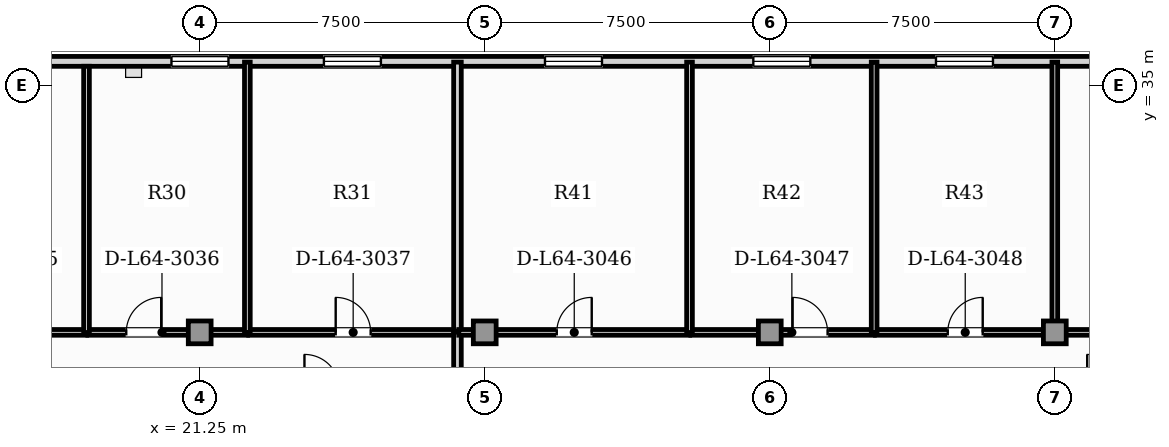
"""IFC4 building model, lengths in metres.
Left out: names, types, materials, properties, quantities, classifications, styles, units other than length and angle.
Written with IfcOpenShell. Run it as: python <this file> out.ifc"""

import sys

from ifc_helpers import new_model, si_unit, direction, frame, frame_2d, origin, origin_2d, place, context, subcontext, project, spatial, rectangle, extrude, element, fill, save


model = new_model("IFC4")
c1 = context("Model", 3, precision=1e-05, world=origin(), true_north=direction((0.0, 1.0)))
c2 = subcontext(c1, "Body", "Model", "MODEL_VIEW")
j1 = project(units=[si_unit("LENGTHUNIT", "METRE"), si_unit("PLANEANGLEUNIT", "RADIAN")], contexts=[c1])
p1 = place(None, origin())
s1 = spatial("IfcSite", under=j1, at=p1, CompositionType="ELEMENT")
p2 = place(p1, origin())
s2 = spatial("IfcBuilding", under=s1, at=p2, CompositionType="ELEMENT")
p3 = place(p2, frame((0.0, 0.0, 260.6)))
s3 = spatial("IfcBuildingStorey", under=s2, at=p3, CompositionType="ELEMENT", Elevation=260.6)
for number, where, z_axis, x_axis in (
    (1, (21.25, 28.5, 0.0), (0.0, 0.0, 1.0), (1.0, 0.0, 0.0)),
    (2, (28.75, 28.5, 0.0), (0.0, 0.0, 1.0), (1.0, 0.0, 0.0)),
    (3, (36.25, 28.5, 0.0), (0.0, 0.0, 1.0), (1.0, 0.0, 0.0)),
    (4, (43.75, 28.5, 0.0), (0.0, 0.0, 1.0), (1.0, 0.0, 0.0)),
):
    element("IfcColumn", number, at=place(p3, frame(where, z_axis=z_axis, x_axis=x_axis)), inside=s3, PredefinedType="COLUMN", context=c2, shape_type="SweptSolid", body=[
        extrude(rectangle(XDim=0.6, YDim=0.6, at=origin_2d()), origin(), (0.0, 0.0, 1.0), 3.85),
    ])
p4 = place(p3, frame((46.262, 35.631, 0.0), z_axis=(0.0, 0.0, 1.0), x_axis=(-1.0, 0.0, 0.0)))
e5 = element("IfcWall", 5, at=p4, inside=s3, PredefinedType="SOLIDWALL", context=c2, shape_type="SweptSolid", body=[
    extrude(rectangle(XDim=35.024, YDim=0.26, at=frame_2d((17.512, 0.0))), origin(), (0.0, 0.0, 1.0), 3.65),
])
p5 = place(p4, frame((32.755, 0.0, 0.9)))
e6 = element("IfcOpeningElement", 6, at=p5, cuts=e5, PredefinedType="OPENING", context=c2, shape_type="SweptSolid", body=[
    extrude(rectangle(XDim=1.5, YDim=1.95, at=frame_2d((0.75, 0.975))), frame((0.0, 0.14, 0.0), z_axis=(0.0, -1.0, 0.0), x_axis=(1.0, 0.0, 0.0)), (0.0, 0.0, 1.0), 0.28),
])
p6 = place(p4, frame((29.501, 0.0, 0.9)))
e7 = element("IfcOpeningElement", 7, at=p6, cuts=e5, PredefinedType="OPENING", context=c2, shape_type="SweptSolid", body=[
    extrude(rectangle(XDim=1.5, YDim=1.95, at=frame_2d((0.75, 0.975))), frame((0.0, 0.14, 0.0), z_axis=(0.0, -1.0, 0.0), x_axis=(1.0, 0.0, 0.0)), (0.0, 0.0, 1.0), 0.28),
])
p7 = place(p4, frame((24.255, 0.0, 0.9)))
e8 = element("IfcOpeningElement", 8, at=p7, cuts=e5, PredefinedType="OPENING", context=c2, shape_type="SweptSolid", body=[
    extrude(rectangle(XDim=1.5, YDim=1.95, at=frame_2d((0.75, 0.975))), frame((0.0, 0.14, 0.0), z_axis=(0.0, -1.0, 0.0), x_axis=(1.0, 0.0, 0.0)), (0.0, 0.0, 1.0), 0.28),
])
p8 = place(p4, frame((20.244, 0.0, 0.9)))
e9 = element("IfcOpeningElement", 9, at=p8, cuts=e5, PredefinedType="OPENING", context=c2, shape_type="SweptSolid", body=[
    extrude(rectangle(XDim=1.5, YDim=1.95, at=frame_2d((0.75, 0.975))), frame((0.0, 0.14, 0.0), z_axis=(0.0, -1.0, 0.0), x_axis=(1.0, 0.0, 0.0)), (0.0, 0.0, 1.0), 0.28),
])
p9 = place(p4, frame((14.427, 0.0, 0.9)))
e10 = element("IfcOpeningElement", 10, at=p9, cuts=e5, PredefinedType="OPENING", context=c2, shape_type="SweptSolid", body=[
    extrude(rectangle(XDim=1.5, YDim=1.95, at=frame_2d((0.75, 0.975))), frame((0.0, 0.14, 0.0), z_axis=(0.0, -1.0, 0.0), x_axis=(1.0, 0.0, 0.0)), (0.0, 0.0, 1.0), 0.28),
])
p10 = place(p4, frame((8.945, 0.0, 0.9)))
e11 = element("IfcOpeningElement", 11, at=p10, cuts=e5, PredefinedType="OPENING", context=c2, shape_type="SweptSolid", body=[
    extrude(rectangle(XDim=1.5, YDim=1.95, at=frame_2d((0.75, 0.975))), frame((0.0, 0.14, 0.0), z_axis=(0.0, -1.0, 0.0), x_axis=(1.0, 0.0, 0.0)), (0.0, 0.0, 1.0), 0.28),
])
p11 = place(p4, frame((4.139, 0.0, 0.9)))
e12 = element("IfcOpeningElement", 12, at=p11, cuts=e5, PredefinedType="OPENING", context=c2, shape_type="SweptSolid", body=[
    extrude(rectangle(XDim=1.5, YDim=1.95, at=frame_2d((0.75, 0.975))), frame((0.0, 0.14, 0.0), z_axis=(0.0, -1.0, 0.0), x_axis=(1.0, 0.0, 0.0)), (0.0, 0.0, 1.0), 0.28),
])
p12 = place(p3, frame((13.785, 28.5, 0.0), z_axis=(0.0, 0.0, 1.0), x_axis=(1.0, 0.0, 0.0)))
e13 = element("IfcWall", 13, at=p12, inside=s3, PredefinedType="PARTITIONING", context=c2, shape_type="SweptSolid", body=[
    extrude(rectangle(XDim=4.492, YDim=0.15, at=frame_2d((2.246, 0.0))), origin(), (0.0, 0.0, 1.0), 3.105),
])
p13 = place(p12, frame((1.786, 0.0, 0.0)))
e14 = element("IfcOpeningElement", 14, at=p13, cuts=e13, PredefinedType="OPENING", context=c2, shape_type="SweptSolid", body=[
    extrude(rectangle(XDim=0.92, YDim=2.1, at=frame_2d((0.46, 1.05))), frame((0.0, 0.085, 0.0), z_axis=(0.0, -1.0, 0.0), x_axis=(1.0, 0.0, 0.0)), (0.0, 0.0, 1.0), 0.17),
])
p14 = place(p3, frame((18.307, 28.5, 0.0), z_axis=(0.0, 0.0, 1.0), x_axis=(1.0, 0.0, 0.0)))
e15 = element("IfcWall", 15, at=p14, inside=s3, PredefinedType="PARTITIONING", context=c2, shape_type="SweptSolid", body=[
    extrude(rectangle(XDim=4.202, YDim=0.15, at=frame_2d((2.101, 0.0))), origin(), (0.0, 0.0, 1.0), 3.105),
])
p15 = place(p14, frame((1.011, 0.0, 0.0)))
e16 = element("IfcOpeningElement", 16, at=p15, cuts=e15, PredefinedType="OPENING", context=c2, shape_type="SweptSolid", body=[
    extrude(rectangle(XDim=0.92, YDim=2.1, at=frame_2d((0.46, 1.05))), frame((0.0, 0.085, 0.0), z_axis=(0.0, -1.0, 0.0), x_axis=(1.0, 0.0, 0.0)), (0.0, 0.0, 1.0), 0.17),
])
p16 = place(p3, frame((22.539, 28.5, 0.0), z_axis=(0.0, 0.0, 1.0), x_axis=(1.0, 0.0, 0.0)))
e17 = element("IfcWall", 17, at=p16, inside=s3, PredefinedType="PARTITIONING", context=c2, shape_type="SweptSolid", body=[
    extrude(rectangle(XDim=5.499, YDim=0.15, at=frame_2d((2.749, 0.0))), origin(), (0.0, 0.0, 1.0), 3.105),
])
p17 = place(p16, frame((2.289, 0.0, 0.0)))
e18 = element("IfcOpeningElement", 18, at=p17, cuts=e17, PredefinedType="OPENING", context=c2, shape_type="SweptSolid", body=[
    extrude(rectangle(XDim=0.92, YDim=2.1, at=frame_2d((0.46, 1.05))), frame((0.0, 0.085, 0.0), z_axis=(0.0, -1.0, 0.0), x_axis=(1.0, 0.0, 0.0)), (0.0, 0.0, 1.0), 0.17),
])
p18 = place(p3, frame((28.032, 26.995, 0.0), z_axis=(0.0, 0.0, 1.0), x_axis=(0.0, 1.0, 0.0)))
e19 = element("IfcWall", 19, at=p18, inside=s3, PredefinedType="PARTITIONING", context=c2, shape_type="SweptSolid", body=[
    extrude(rectangle(XDim=1.51, YDim=0.2, at=frame_2d((0.755, 0.0))), origin(), (0.0, 0.0, 1.0), 3.65),
])
p19 = place(p3, frame((18.272, 28.495, 0.0), z_axis=(0.0, 0.0, 1.0), x_axis=(0.0, 1.0, 0.0)))
e20 = element("IfcWall", 20, at=p19, inside=s3, PredefinedType="PARTITIONING", context=c2, shape_type="SweptSolid", body=[
    extrude(rectangle(XDim=7.007, YDim=0.15, at=frame_2d((3.503, 0.0))), origin(), (0.0, 0.0, 1.0), 3.65),
])
p20 = place(p3, frame((22.504, 28.495, 0.0), z_axis=(0.0, 0.0, 1.0), x_axis=(0.0, 1.0, 0.0)))
e21 = element("IfcWall", 21, at=p20, inside=s3, PredefinedType="PARTITIONING", context=c2, shape_type="SweptSolid", body=[
    extrude(rectangle(XDim=7.116, YDim=0.15, at=frame_2d((3.558, 0.0))), origin(), (0.0, 0.0, 1.0), 3.65),
])
p21 = place(p3, frame((28.032, 28.535, 0.0), z_axis=(0.0, 0.0, 1.0), x_axis=(0.0, 1.0, 0.0)))
e22 = element("IfcWall", 22, at=p21, inside=s3, PredefinedType="PARTITIONING", context=c2, shape_type="SweptSolid", body=[
    extrude(rectangle(XDim=7.076, YDim=0.2, at=frame_2d((3.538, 0.0))), origin(), (0.0, 0.0, 1.0), 3.65),
])
p22 = place(p3, frame((28.067, 28.5, 0.0), z_axis=(0.0, 0.0, 1.0), x_axis=(1.0, 0.0, 0.0)))
e23 = element("IfcWall", 23, at=p22, inside=s3, PredefinedType="PARTITIONING", context=c2, shape_type="SweptSolid", body=[
    extrude(rectangle(XDim=6.076, YDim=0.15, at=frame_2d((3.038, 0.0))), origin(), (0.0, 0.0, 1.0), 3.105),
])
p23 = place(p22, frame((2.578, 0.0, 0.0)))
e24 = element("IfcOpeningElement", 24, at=p23, cuts=e23, PredefinedType="OPENING", context=c2, shape_type="SweptSolid", body=[
    extrude(rectangle(XDim=0.92, YDim=2.1, at=frame_2d((0.46, 1.05))), frame((0.0, 0.085, 0.0), z_axis=(0.0, -1.0, 0.0), x_axis=(1.0, 0.0, 0.0)), (0.0, 0.0, 1.0), 0.17),
])
p24 = place(p3, frame((34.173, 28.5, 0.0), z_axis=(0.0, 0.0, 1.0), x_axis=(1.0, 0.0, 0.0)))
e25 = element("IfcWall", 25, at=p24, inside=s3, PredefinedType="PARTITIONING", context=c2, shape_type="SweptSolid", body=[
    extrude(rectangle(XDim=4.828, YDim=0.15, at=frame_2d((2.414, 0.0))), origin(), (0.0, 0.0, 1.0), 3.105),
])
p25 = place(p24, frame((2.678, 0.0, 0.0)))
e26 = element("IfcOpeningElement", 26, at=p25, cuts=e25, PredefinedType="OPENING", context=c2, shape_type="SweptSolid", body=[
    extrude(rectangle(XDim=0.92, YDim=2.1, at=frame_2d((0.46, 1.05))), frame((0.0, 0.085, 0.0), z_axis=(0.0, -1.0, 0.0), x_axis=(1.0, 0.0, 0.0)), (0.0, 0.0, 1.0), 0.17),
])
p26 = place(p3, frame((39.031, 28.5, 0.0), z_axis=(0.0, 0.0, 1.0), x_axis=(1.0, 0.0, 0.0)))
e27 = element("IfcWall", 27, at=p26, inside=s3, PredefinedType="PARTITIONING", context=c2, shape_type="SweptSolid", body=[
    extrude(rectangle(XDim=4.724, YDim=0.15, at=frame_2d((2.362, 0.0))), origin(), (0.0, 0.0, 1.0), 3.105),
])
p27 = place(p26, frame((1.902, 0.0, 0.0)))
e28 = element("IfcOpeningElement", 28, at=p27, cuts=e27, PredefinedType="OPENING", context=c2, shape_type="SweptSolid", body=[
    extrude(rectangle(XDim=0.92, YDim=2.1, at=frame_2d((0.46, 1.05))), frame((0.0, 0.085, 0.0), z_axis=(0.0, -1.0, 0.0), x_axis=(1.0, 0.0, 0.0)), (0.0, 0.0, 1.0), 0.17),
])
p28 = place(p3, frame((43.785, 28.5, 0.0), z_axis=(0.0, 0.0, 1.0), x_axis=(1.0, 0.0, 0.0)))
e29 = element("IfcWall", 29, at=p28, inside=s3, PredefinedType="PARTITIONING", context=c2, shape_type="SweptSolid", body=[
    extrude(rectangle(XDim=5.568, YDim=0.15, at=frame_2d((2.784, 0.0))), origin(), (0.0, 0.0, 1.0), 3.65),
])
p29 = place(p28, frame((2.324, 0.0, 0.0)))
e30 = element("IfcOpeningElement", 30, at=p29, cuts=e29, PredefinedType="OPENING", context=c2, shape_type="SweptSolid", body=[
    extrude(rectangle(XDim=0.92, YDim=2.1, at=frame_2d((0.46, 1.05))), frame((0.0, 0.085, 0.0), z_axis=(0.0, -1.0, 0.0), x_axis=(1.0, 0.0, 0.0)), (0.0, 0.0, 1.0), 0.17),
])
for number, where, z_axis, x_axis in (
    (31, (34.138, 28.495, 0.0), (0.0, 0.0, 1.0), (0.0, 1.0, 0.0)),
    (32, (38.996, 28.495, 0.0), (0.0, 0.0, 1.0), (0.0, 1.0, 0.0)),
    (33, (43.75, 28.495, 0.0), (0.0, 0.0, 1.0), (0.0, 1.0, 0.0)),
):
    element("IfcWall", number, at=place(p3, frame(where, z_axis=z_axis, x_axis=x_axis)), inside=s3, PredefinedType="PARTITIONING", context=c2, shape_type="SweptSolid", body=[
        extrude(rectangle(XDim=7.116, YDim=0.15, at=frame_2d((3.558, 0.0))), origin(), (0.0, 0.0, 1.0), 3.65),
    ])
p30 = place(p7, origin())
e34 = element("IfcWindow", 34, at=p30, inside=s3, PartitioningType="SINGLE_PANEL", PredefinedType="WINDOW", context=c2, shape_type="SweptSolid", body=[
    extrude(rectangle(XDim=1.5, YDim=1.95, at=frame_2d((0.75, 0.975))), frame((0.0, 0.03, 0.0), z_axis=(0.0, -1.0, 0.0), x_axis=(1.0, 0.0, 0.0)), (0.0, 0.0, 1.0), 0.06),
])
fill(e8, e34)
p31 = place(p8, origin())
e35 = element("IfcWindow", 35, at=p31, inside=s3, PartitioningType="SINGLE_PANEL", PredefinedType="WINDOW", context=c2, shape_type="SweptSolid", body=[
    extrude(rectangle(XDim=1.5, YDim=1.95, at=frame_2d((0.75, 0.975))), frame((0.0, 0.03, 0.0), z_axis=(0.0, -1.0, 0.0), x_axis=(1.0, 0.0, 0.0)), (0.0, 0.0, 1.0), 0.06),
])
fill(e9, e35)
p32 = place(p9, origin())
e36 = element("IfcWindow", 36, at=p32, inside=s3, PartitioningType="SINGLE_PANEL", PredefinedType="WINDOW", context=c2, shape_type="SweptSolid", body=[
    extrude(rectangle(XDim=1.5, YDim=1.95, at=frame_2d((0.75, 0.975))), frame((0.0, 0.03, 0.0), z_axis=(0.0, -1.0, 0.0), x_axis=(1.0, 0.0, 0.0)), (0.0, 0.0, 1.0), 0.06),
])
fill(e10, e36)
p33 = place(p10, origin())
e37 = element("IfcWindow", 37, at=p33, inside=s3, PartitioningType="SINGLE_PANEL", PredefinedType="WINDOW", context=c2, shape_type="SweptSolid", body=[
    extrude(rectangle(XDim=1.5, YDim=1.95, at=frame_2d((0.75, 0.975))), frame((0.0, 0.03, 0.0), z_axis=(0.0, -1.0, 0.0), x_axis=(1.0, 0.0, 0.0)), (0.0, 0.0, 1.0), 0.06),
])
fill(e11, e37)
p34 = place(p11, origin())
e38 = element("IfcWindow", 38, at=p34, inside=s3, PartitioningType="SINGLE_PANEL", PredefinedType="WINDOW", context=c2, shape_type="SweptSolid", body=[
    extrude(rectangle(XDim=1.5, YDim=1.95, at=frame_2d((0.75, 0.975))), frame((0.0, 0.03, 0.0), z_axis=(0.0, -1.0, 0.0), x_axis=(1.0, 0.0, 0.0)), (0.0, 0.0, 1.0), 0.06),
])
fill(e12, e38)
p35 = place(p15, origin())
e39 = element("IfcDoor", 39, at=p35, inside=s3, OperationType="SINGLE_SWING_RIGHT", PredefinedType="DOOR", context=c2, shape_type="SweptSolid", body=[
    extrude(rectangle(XDim=0.92, YDim=2.1, at=frame_2d((0.46, 1.05))), frame((0.0, 0.025, 0.0), z_axis=(0.0, -1.0, 0.0), x_axis=(1.0, 0.0, 0.0)), (0.0, 0.0, 1.0), 0.05),
])
fill(e16, e39)
p36 = place(p17, origin())
e40 = element("IfcDoor", 40, at=p36, inside=s3, OperationType="SINGLE_SWING_LEFT", PredefinedType="DOOR", context=c2, shape_type="SweptSolid", body=[
    extrude(rectangle(XDim=0.92, YDim=2.1, at=frame_2d((0.46, 1.05))), frame((0.0, 0.025, 0.0), z_axis=(0.0, -1.0, 0.0), x_axis=(1.0, 0.0, 0.0)), (0.0, 0.0, 1.0), 0.05),
])
fill(e18, e40)
p37 = place(p23, origin())
e41 = element("IfcDoor", 41, at=p37, inside=s3, OperationType="SINGLE_SWING_RIGHT", PredefinedType="DOOR", context=c2, shape_type="SweptSolid", body=[
    extrude(rectangle(XDim=0.92, YDim=2.1, at=frame_2d((0.46, 1.05))), frame((0.0, 0.025, 0.0), z_axis=(0.0, -1.0, 0.0), x_axis=(1.0, 0.0, 0.0)), (0.0, 0.0, 1.0), 0.05),
])
fill(e24, e41)
p38 = place(p25, origin())
e42 = element("IfcDoor", 42, at=p38, inside=s3, OperationType="SINGLE_SWING_LEFT", PredefinedType="DOOR", context=c2, shape_type="SweptSolid", body=[
    extrude(rectangle(XDim=0.92, YDim=2.1, at=frame_2d((0.46, 1.05))), frame((0.0, 0.025, 0.0), z_axis=(0.0, -1.0, 0.0), x_axis=(1.0, 0.0, 0.0)), (0.0, 0.0, 1.0), 0.05),
])
fill(e26, e42)
p39 = place(p27, origin())
e43 = element("IfcDoor", 43, at=p39, inside=s3, OperationType="SINGLE_SWING_RIGHT", PredefinedType="DOOR", context=c2, shape_type="SweptSolid", body=[
    extrude(rectangle(XDim=0.92, YDim=2.1, at=frame_2d((0.46, 1.05))), frame((0.0, 0.025, 0.0), z_axis=(0.0, -1.0, 0.0), x_axis=(1.0, 0.0, 0.0)), (0.0, 0.0, 1.0), 0.05),
])
fill(e28, e43)
save(model, sys.argv[1])
